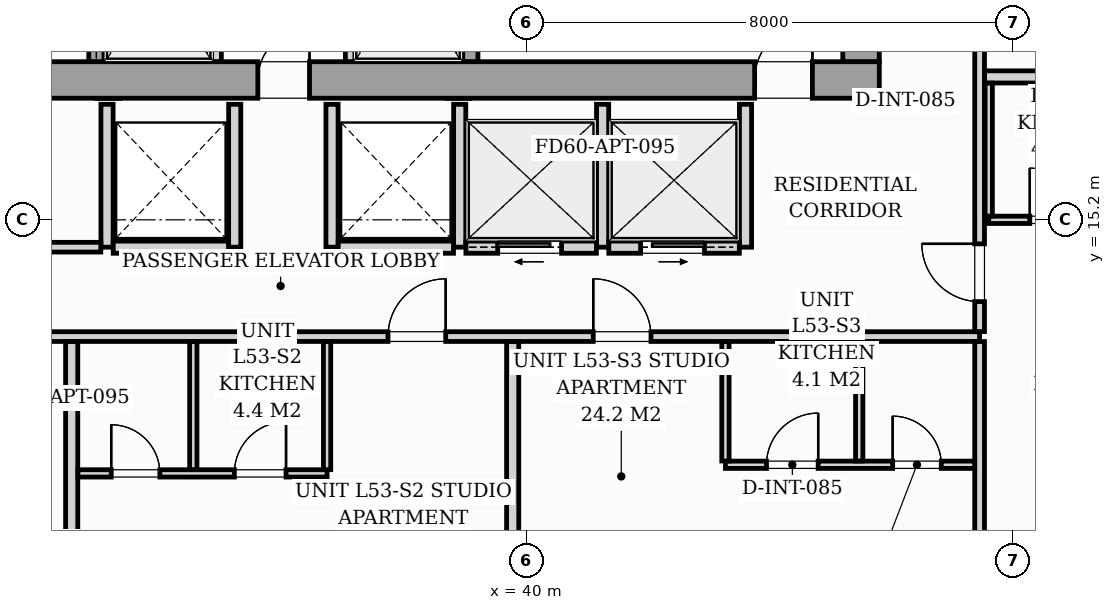
"""IFC4 building model, lengths in metres.
Left out: names, types, materials, properties, quantities, classifications, styles, units other than length and angle.
Written with IfcOpenShell. Run it as: python <this file> out.ifc"""

import sys

from ifc_helpers import new_model, si_unit, direction, frame, frame_2d, origin, origin_2d, place, context, subcontext, project, spatial, rectangle, i_section, extrude, source, transform, mapped, element, fill, save


model = new_model("IFC4")
c1 = context("Model", 3, precision=1e-05, world=origin(), true_north=direction((0.0, 1.0)))
c2 = subcontext(c1, "Body", "Model", "MODEL_VIEW")
j1 = project(units=[si_unit("LENGTHUNIT", "METRE"), si_unit("PLANEANGLEUNIT", "RADIAN")], contexts=[c1])
p1 = place(None, origin())
s1 = spatial("IfcSite", under=j1, at=p1, CompositionType="ELEMENT")
p2 = place(p1, origin())
s2 = spatial("IfcBuilding", under=s1, at=p2, CompositionType="ELEMENT")
p3 = place(p2, frame((0.0, 0.0, 185.8)))
s3 = spatial("IfcBuildingStorey", under=s2, at=p3, CompositionType="ELEMENT", Elevation=185.8)
m1 = source(origin(), c2, "Body", "SweptSolid", [
    extrude(i_section(OverallWidth=0.416, OverallDepth=0.446, WebThickness=0.039, FlangeThickness=0.063, FilletRadius=0.018, at=origin_2d()), origin(), (0.0, 0.0, 1.0), 3.196),
])
for number, where, z_axis, x_axis in (
    (1, (33.12, 17.4, 0.002), (0.0, 0.0, 1.0), (1.0, 0.0, 0.0)),
    (2, (38.88, 17.4, 0.002), (0.0, 0.0, 1.0), (1.0, 0.0, 0.0)),
    (3, (45.6, 17.4, 0.002), (0.0, 0.0, 1.0), (1.0, 0.0, 0.0)),
):
    element("IfcColumn", number, at=place(p3, frame(where, z_axis=z_axis, x_axis=x_axis)), inside=s3, PredefinedType="PILASTER", context=c2, shape_type="MappedRepresentation", body=[
        mapped(m1, transform((0.0, 0.0, 0.0), scale=1.0)),
    ])
p4 = place(p3, frame((62.963, 10.676, 0.0), z_axis=(0.0, 0.0, 1.0), x_axis=(-0.995395627913, -0.095851676732, 0.0)))
e4 = element("IfcWall", 4, at=p4, inside=s3, PredefinedType="STANDARD", context=c2, shape_type="SweptSolid", body=[
    extrude(rectangle(XDim=16.1, YDim=0.26, at=frame_2d((8.05, 0.0))), origin(), (0.0, 0.0, 1.0), 2.94),
])
p5 = place(p4, frame((8.101, 0.0, 0.0)))
e5 = element("IfcOpeningElement", 5, at=p5, cuts=e4, PredefinedType="OPENING", context=c2, shape_type="SweptSolid", body=[
    extrude(rectangle(XDim=1.8, YDim=2.06, at=frame_2d((0.9, 1.03))), frame((0.0, 0.14, 0.0), z_axis=(0.0, -1.0, 0.0), x_axis=(1.0, 0.0, 0.0)), (0.0, 0.0, 1.0), 0.28),
])
p6 = place(p4, frame((2.05, 0.0, 0.65)))
e6 = element("IfcOpeningElement", 6, at=p6, cuts=e4, PredefinedType="OPENING", context=c2, shape_type="SweptSolid", body=[
    extrude(rectangle(XDim=1.6, YDim=1.5, at=frame_2d((0.8, 0.75))), frame((0.0, 0.14, 0.0), z_axis=(0.0, -1.0, 0.0), x_axis=(1.0, 0.0, 0.0)), (0.0, 0.0, 1.0), 0.28),
])
p7 = place(p3, frame((26.2, 17.5, 0.0), z_axis=(0.0, 0.0, 1.0), x_axis=(1.0, 0.0, 0.0)))
e7 = element("IfcWall", 7, at=p7, inside=s3, PredefinedType="SHEAR", context=c2, shape_type="SweptSolid", body=[
    extrude(rectangle(XDim=19.6, YDim=0.6, at=frame_2d((9.8, 0.0))), origin(), (0.0, 0.0, 1.0), 3.2),
])
p8 = place(p7, frame((0.95, 0.0, 0.0)))
e8 = element("IfcOpeningElement", 8, at=p8, cuts=e7, PredefinedType="OPENING", context=c2, shape_type="SweptSolid", body=[
    extrude(rectangle(XDim=0.95, YDim=2.06, at=frame_2d((0.475, 1.03))), frame((0.0, 0.31, 0.0), z_axis=(0.0, -1.0, 0.0), x_axis=(1.0, 0.0, 0.0)), (0.0, 0.0, 1.0), 0.62),
])
p9 = place(p7, frame((9.38, 0.0, 0.0)))
e9 = element("IfcOpeningElement", 9, at=p9, cuts=e7, PredefinedType="OPENING", context=c2, shape_type="SweptSolid", body=[
    extrude(rectangle(XDim=0.85, YDim=2.0, at=frame_2d((0.425, 1.0))), frame((0.0, 0.31, 0.0), z_axis=(0.0, -1.0, 0.0), x_axis=(1.0, 0.0, 0.0)), (0.0, 0.0, 1.0), 0.62),
])
p10 = place(p7, frame((17.55, 0.0, 0.0)))
e10 = element("IfcOpeningElement", 10, at=p10, cuts=e7, PredefinedType="OPENING", context=c2, shape_type="SweptSolid", body=[
    extrude(rectangle(XDim=0.95, YDim=2.06, at=frame_2d((0.475, 1.03))), frame((0.0, 0.31, 0.0), z_axis=(0.0, -1.0, 0.0), x_axis=(1.0, 0.0, 0.0)), (0.0, 0.0, 1.0), 0.62),
])
p11 = place(p3, frame((45.5, 17.802, 0.0), z_axis=(0.0, 0.0, 1.0), x_axis=(0.0, 1.0, 0.0)))
e11 = element("IfcWall", 11, at=p11, inside=s3, PredefinedType="SHEAR", context=c2, shape_type="SweptSolid", body=[
    extrude(rectangle(XDim=5.796, YDim=0.6, at=frame_2d((2.898, 0.0))), origin(), (0.0, 0.0, 1.0), 3.2),
])
p12 = place(p3, frame((32.925, 17.802, 0.0), z_axis=(0.0, 0.0, 1.0), x_axis=(0.0, 1.0, 0.0)))
e12 = element("IfcWall", 12, at=p12, inside=s3, PredefinedType="SOLIDWALL", context=c2, shape_type="SweptSolid", body=[
    extrude(rectangle(XDim=2.646, YDim=0.25, at=frame_2d((1.323, 0.0))), origin(), (0.0, 0.0, 1.0), 3.2),
])
p13 = place(p12, frame((0.548, 0.0, 0.0)))
e13 = element("IfcOpeningElement", 13, at=p13, cuts=e12, PredefinedType="OPENING", context=c2, shape_type="SweptSolid", body=[
    extrude(rectangle(XDim=1.1, YDim=2.08, at=frame_2d((0.55, 1.04))), frame((0.0, 0.135, 0.0), z_axis=(0.0, -1.0, 0.0), x_axis=(1.0, 0.0, 0.0)), (0.0, 0.0, 1.0), 0.27),
])
for number, where, z_axis, x_axis in (
    (14, (34.9, 17.802, 0.0), (0.0, 0.0, 1.0), (0.0, 1.0, 0.0)),
    (15, (37.1, 17.802, 0.0), (0.0, 0.0, 1.0), (0.0, 1.0, 0.0)),
):
    element("IfcWall", number, at=place(p3, frame(where, z_axis=z_axis, x_axis=x_axis)), inside=s3, PredefinedType="PARTITIONING", context=c2, shape_type="SweptSolid", body=[
        extrude(rectangle(XDim=2.646, YDim=0.16, at=frame_2d((1.323, 0.0))), origin(), (0.0, 0.0, 1.0), 2.94),
    ])
p14 = place(p3, frame((39.075, 17.802, 0.0), z_axis=(0.0, 0.0, 1.0), x_axis=(0.0, 1.0, 0.0)))
e16 = element("IfcWall", 16, at=p14, inside=s3, PredefinedType="SOLIDWALL", context=c2, shape_type="SweptSolid", body=[
    extrude(rectangle(XDim=2.646, YDim=0.25, at=frame_2d((1.323, 0.0))), origin(), (0.0, 0.0, 1.0), 3.2),
])
p15 = place(p14, frame((0.548, 0.0, 0.0)))
e17 = element("IfcOpeningElement", 17, at=p15, cuts=e16, PredefinedType="OPENING", context=c2, shape_type="SweptSolid", body=[
    extrude(rectangle(XDim=1.1, YDim=2.08, at=frame_2d((0.55, 1.04))), frame((0.0, 0.135, 0.0), z_axis=(0.0, -1.0, 0.0), x_axis=(1.0, 0.0, 0.0)), (0.0, 0.0, 1.0), 0.27),
])
p16 = place(p3, frame((33.1, 14.75, 0.0), z_axis=(0.0, 0.0, 1.0), x_axis=(0.0, 1.0, 0.0)))
e18 = element("IfcWall", 18, at=p16, inside=s3, PredefinedType="PARTITIONING", context=c2, shape_type="SweptSolid", body=[
    extrude(rectangle(XDim=2.35, YDim=0.2, at=frame_2d((1.175, 0.0))), origin(), (0.0, 0.0, 1.0), 2.94),
])
p17 = place(p3, frame((28.482, 14.75, 0.0), z_axis=(0.0, 0.0, 1.0), x_axis=(1.0, 0.0, 0.0)))
e19 = element("IfcWall", 19, at=p17, inside=s3, PredefinedType="PARTITIONING", context=c2, shape_type="SweptSolid", body=[
    extrude(rectangle(XDim=4.516, YDim=0.16, at=frame_2d((2.258, 0.0))), origin(), (0.0, 0.0, 1.0), 2.94),
])
p18 = place(p17, frame((1.868, 0.0, 0.0)))
e20 = element("IfcOpeningElement", 20, at=p18, cuts=e19, PredefinedType="OPENING", context=c2, shape_type="SweptSolid", body=[
    extrude(rectangle(XDim=0.8, YDim=2.05, at=frame_2d((0.4, 1.025))), frame((0.0, 0.09, 0.0), z_axis=(0.0, -1.0, 0.0), x_axis=(1.0, 0.0, 0.0)), (0.0, 0.0, 1.0), 0.18),
])
p19 = place(p3, frame((35.2, 14.75, 0.0), z_axis=(0.0, 0.0, 1.0), x_axis=(0.0, 1.0, 0.0)))
e21 = element("IfcWall", 21, at=p19, inside=s3, PredefinedType="PARTITIONING", context=c2, shape_type="SweptSolid", body=[
    extrude(rectangle(XDim=2.35, YDim=0.2, at=frame_2d((1.175, 0.0))), origin(), (0.0, 0.0, 1.0), 2.94),
])
p20 = place(p3, frame((33.202, 14.75, 0.0), z_axis=(0.0, 0.0, 1.0), x_axis=(1.0, 0.0, 0.0)))
e22 = element("IfcWall", 22, at=p20, inside=s3, PredefinedType="PARTITIONING", context=c2, shape_type="SweptSolid", body=[
    extrude(rectangle(XDim=1.896, YDim=0.2, at=frame_2d((0.948, 0.0))), origin(), (0.0, 0.0, 1.0), 2.94),
])
for number, where, z_axis, x_axis in (
    (23, (36.8, 14.75, 0.0), (0.0, 0.0, 1.0), (0.0, 1.0, 0.0)),
    (24, (38.9, 14.75, 0.0), (0.0, 0.0, 1.0), (0.0, 1.0, 0.0)),
):
    element("IfcWall", number, at=place(p3, frame(where, z_axis=z_axis, x_axis=x_axis)), inside=s3, PredefinedType="PARTITIONING", context=c2, shape_type="SweptSolid", body=[
        extrude(rectangle(XDim=2.35, YDim=0.2, at=frame_2d((1.175, 0.0))), origin(), (0.0, 0.0, 1.0), 2.94),
    ])
p21 = place(p3, frame((36.902, 14.75, 0.0), z_axis=(0.0, 0.0, 1.0), x_axis=(1.0, 0.0, 0.0)))
e25 = element("IfcWall", 25, at=p21, inside=s3, PredefinedType="PARTITIONING", context=c2, shape_type="SweptSolid", body=[
    extrude(rectangle(XDim=1.896, YDim=0.2, at=frame_2d((0.948, 0.0))), origin(), (0.0, 0.0, 1.0), 2.94),
])
for number, where, z_axis, x_axis in (
    (26, (41.25, 14.75, 0.0), (0.0, 0.0, 1.0), (0.0, 1.0, 0.0)),
    (27, (43.6, 14.75, 0.0), (0.0, 0.0, 1.0), (0.0, 1.0, 0.0)),
):
    element("IfcWall", number, at=place(p3, frame(where, z_axis=z_axis, x_axis=x_axis)), inside=s3, PredefinedType="PARTITIONING", context=c2, shape_type="SweptSolid", body=[
        extrude(rectangle(XDim=2.35, YDim=0.2, at=frame_2d((1.175, 0.0))), origin(), (0.0, 0.0, 1.0), 2.94),
    ])
p22 = place(p3, frame((39.002, 14.75, 0.0), z_axis=(0.0, 0.0, 1.0), x_axis=(1.0, 0.0, 0.0)))
e28 = element("IfcWall", 28, at=p22, inside=s3, PredefinedType="PARTITIONING", context=c2, shape_type="SweptSolid", body=[
    extrude(rectangle(XDim=2.146, YDim=0.2, at=frame_2d((1.073, 0.0))), origin(), (0.0, 0.0, 1.0), 2.94),
])
p23 = place(p22, frame((0.523, 0.0, 0.0)))
e29 = element("IfcOpeningElement", 29, at=p23, cuts=e28, PredefinedType="OPENING", context=c2, shape_type="SweptSolid", body=[
    extrude(rectangle(XDim=1.05, YDim=2.08, at=frame_2d((0.525, 1.04))), frame((0.0, 0.11, 0.0), z_axis=(0.0, -1.0, 0.0), x_axis=(1.0, 0.0, 0.0)), (0.0, 0.0, 1.0), 0.22),
])
p24 = place(p3, frame((41.352, 14.75, 0.0), z_axis=(0.0, 0.0, 1.0), x_axis=(1.0, 0.0, 0.0)))
e30 = element("IfcWall", 30, at=p24, inside=s3, PredefinedType="PARTITIONING", context=c2, shape_type="SweptSolid", body=[
    extrude(rectangle(XDim=2.146, YDim=0.2, at=frame_2d((1.073, 0.0))), origin(), (0.0, 0.0, 1.0), 2.94),
])
p25 = place(p24, frame((0.523, 0.0, 0.0)))
e31 = element("IfcOpeningElement", 31, at=p25, cuts=e30, PredefinedType="OPENING", context=c2, shape_type="SweptSolid", body=[
    extrude(rectangle(XDim=1.05, YDim=2.08, at=frame_2d((0.525, 1.04))), frame((0.0, 0.11, 0.0), z_axis=(0.0, -1.0, 0.0), x_axis=(1.0, 0.0, 0.0)), (0.0, 0.0, 1.0), 0.22),
])
p26 = place(p3, frame((26.12, 13.28, 0.0), z_axis=(0.0, 0.0, 1.0), x_axis=(1.0, 0.0, 0.0)))
e32 = element("IfcWall", 32, at=p26, inside=s3, PredefinedType="PARTITIONING", context=c2, shape_type="SweptSolid", body=[
    extrude(rectangle(XDim=21.33, YDim=0.16, at=frame_2d((10.665, 0.0))), origin(), (0.0, 0.0, 1.0), 2.94),
])
p27 = place(p26, frame((4.704, 0.0, 0.0)))
e33 = element("IfcOpeningElement", 33, at=p27, cuts=e32, PredefinedType="OPENING", context=c2, shape_type="SweptSolid", body=[
    extrude(rectangle(XDim=0.95, YDim=2.06, at=frame_2d((0.475, 1.03))), frame((0.0, 0.09, 0.0), z_axis=(0.0, -1.0, 0.0), x_axis=(1.0, 0.0, 0.0)), (0.0, 0.0, 1.0), 0.18),
])
p28 = place(p26, frame((11.6, 0.0, 0.0)))
e34 = element("IfcOpeningElement", 34, at=p28, cuts=e32, PredefinedType="OPENING", context=c2, shape_type="SweptSolid", body=[
    extrude(rectangle(XDim=0.95, YDim=2.06, at=frame_2d((0.475, 1.03))), frame((0.0, 0.09, 0.0), z_axis=(0.0, -1.0, 0.0), x_axis=(1.0, 0.0, 0.0)), (0.0, 0.0, 1.0), 0.18),
])
p29 = place(p26, frame((14.976, 0.0, 0.0)))
e35 = element("IfcOpeningElement", 35, at=p29, cuts=e32, PredefinedType="OPENING", context=c2, shape_type="SweptSolid", body=[
    extrude(rectangle(XDim=0.95, YDim=2.06, at=frame_2d((0.475, 1.03))), frame((0.0, 0.09, 0.0), z_axis=(0.0, -1.0, 0.0), x_axis=(1.0, 0.0, 0.0)), (0.0, 0.0, 1.0), 0.18),
])
p30 = place(p3, frame((47.45, 9.315, 0.0), z_axis=(0.0, 0.0, 1.0), x_axis=(0.0, 1.0, 0.0)))
e36 = element("IfcWall", 36, at=p30, inside=s3, PredefinedType="PARTITIONING", context=c2, shape_type="SweptSolid", body=[
    extrude(rectangle(XDim=3.883, YDim=0.16, at=frame_2d((1.941, 0.0))), origin(), (0.0, 0.0, 1.0), 2.94),
])
p31 = place(p3, frame((47.45, 13.362, 0.0), z_axis=(0.0, 0.0, 1.0), x_axis=(0.0, 1.0, 0.0)))
e37 = element("IfcWall", 37, at=p31, inside=s3, PredefinedType="PARTITIONING", context=c2, shape_type="SweptSolid", body=[
    extrude(rectangle(XDim=7.288, YDim=0.16, at=frame_2d((3.644, 0.0))), origin(), (0.0, 0.0, 1.0), 2.94),
])
p32 = place(p31, frame((0.493, 0.0, 0.0)))
e38 = element("IfcOpeningElement", 38, at=p32, cuts=e37, PredefinedType="OPENING", context=c2, shape_type="SweptSolid", body=[
    extrude(rectangle(XDim=0.95, YDim=2.06, at=frame_2d((0.475, 1.03))), frame((0.0, 0.09, 0.0), z_axis=(0.0, -1.0, 0.0), x_axis=(1.0, 0.0, 0.0)), (0.0, 0.0, 1.0), 0.18),
])
p33 = place(p31, frame((4.783, 0.0, 0.0)))
e39 = element("IfcOpeningElement", 39, at=p33, cuts=e37, PredefinedType="OPENING", context=c2, shape_type="SweptSolid", body=[
    extrude(rectangle(XDim=0.95, YDim=2.06, at=frame_2d((0.475, 1.03))), frame((0.0, 0.09, 0.0), z_axis=(0.0, -1.0, 0.0), x_axis=(1.0, 0.0, 0.0)), (0.0, 0.0, 1.0), 0.18),
])
p34 = place(p3, frame((32.519, 7.877, 0.0), z_axis=(0.0, 0.0, 1.0), x_axis=(0.0, 1.0, 0.0)))
e40 = element("IfcWall", 40, at=p34, inside=s3, PredefinedType="PARTITIONING", context=c2, shape_type="SweptSolid", body=[
    extrude(rectangle(XDim=5.321, YDim=0.2, at=frame_2d((2.66, 0.0))), origin(), (0.0, 0.0, 1.0), 2.94),
])
p35 = place(p3, frame((32.621, 11.03, 0.0), z_axis=(0.0, 0.0, 1.0), x_axis=(1.0, 0.0, 0.0)))
e41 = element("IfcWall", 41, at=p35, inside=s3, PredefinedType="PARTITIONING", context=c2, shape_type="SweptSolid", body=[
    extrude(rectangle(XDim=4.098, YDim=0.12, at=frame_2d((2.049, 0.0))), origin(), (0.0, 0.0, 1.0), 2.94),
])
p36 = place(p35, frame((0.548, 0.0, 0.0)))
e42 = element("IfcOpeningElement", 42, at=p36, cuts=e41, PredefinedType="OPENING", context=c2, shape_type="SweptSolid", body=[
    extrude(rectangle(XDim=0.8, YDim=2.02, at=frame_2d((0.4, 1.01))), frame((0.0, 0.07, 0.0), z_axis=(0.0, -1.0, 0.0), x_axis=(1.0, 0.0, 0.0)), (0.0, 0.0, 1.0), 0.14),
])
p37 = place(p35, frame((2.573, 0.0, 0.0)))
e43 = element("IfcOpeningElement", 43, at=p37, cuts=e41, PredefinedType="OPENING", context=c2, shape_type="SweptSolid", body=[
    extrude(rectangle(XDim=0.85, YDim=2.05, at=frame_2d((0.425, 1.025))), frame((0.0, 0.07, 0.0), z_axis=(0.0, -1.0, 0.0), x_axis=(1.0, 0.0, 0.0)), (0.0, 0.0, 1.0), 0.14),
])
for number, where, z_axis, x_axis in (
    (44, (36.719, 11.092, 0.0), (0.0, 0.0, 1.0), (0.0, 1.0, 0.0)),
    (45, (34.519, 11.092, 0.0), (0.0, 0.0, 1.0), (0.0, 1.0, 0.0)),
):
    element("IfcWall", number, at=place(p3, frame(where, z_axis=z_axis, x_axis=x_axis)), inside=s3, PredefinedType="PARTITIONING", context=c2, shape_type="SweptSolid", body=[
        extrude(rectangle(XDim=2.106, YDim=0.12, at=frame_2d((1.053, 0.0))), origin(), (0.0, 0.0, 1.0), 2.94),
    ])
p38 = place(p3, frame((39.771, 8.393, 0.0), z_axis=(0.0, 0.0, 1.0), x_axis=(0.0, 1.0, 0.0)))
e46 = element("IfcWall", 46, at=p38, inside=s3, PredefinedType="PARTITIONING", context=c2, shape_type="SweptSolid", body=[
    extrude(rectangle(XDim=4.805, YDim=0.2, at=frame_2d((2.403, 0.0))), origin(), (0.0, 0.0, 1.0), 2.94),
])
p39 = place(p3, frame((43.27, 11.172, 0.0), z_axis=(0.0, 0.0, 1.0), x_axis=(1.0, 0.0, 0.0)))
e47 = element("IfcWall", 47, at=p39, inside=s3, PredefinedType="PARTITIONING", context=c2, shape_type="SweptSolid", body=[
    extrude(rectangle(XDim=4.098, YDim=0.12, at=frame_2d((2.049, 0.0))), origin(), (0.0, 0.0, 1.0), 2.94),
])
p40 = place(p39, frame((0.675, 0.0, 0.0)))
e48 = element("IfcOpeningElement", 48, at=p40, cuts=e47, PredefinedType="OPENING", context=c2, shape_type="SweptSolid", body=[
    extrude(rectangle(XDim=0.85, YDim=2.05, at=frame_2d((0.425, 1.025))), frame((0.0, 0.07, 0.0), z_axis=(0.0, -1.0, 0.0), x_axis=(1.0, 0.0, 0.0)), (0.0, 0.0, 1.0), 0.14),
])
p41 = place(p39, frame((2.75, 0.0, 0.0)))
e49 = element("IfcOpeningElement", 49, at=p41, cuts=e47, PredefinedType="OPENING", context=c2, shape_type="SweptSolid", body=[
    extrude(rectangle(XDim=0.8, YDim=2.02, at=frame_2d((0.4, 1.01))), frame((0.0, 0.07, 0.0), z_axis=(0.0, -1.0, 0.0), x_axis=(1.0, 0.0, 0.0)), (0.0, 0.0, 1.0), 0.14),
])
for number, where, z_axis, x_axis in (
    (50, (43.27, 11.234, 0.0), (0.0, 0.0, 1.0), (0.0, 1.0, 0.0)),
    (51, (45.47, 11.234, 0.0), (0.0, 0.0, 1.0), (0.0, 1.0, 0.0)),
):
    element("IfcWall", number, at=place(p3, frame(where, z_axis=z_axis, x_axis=x_axis)), inside=s3, PredefinedType="PARTITIONING", context=c2, shape_type="SweptSolid", body=[
        extrude(rectangle(XDim=1.964, YDim=0.12, at=frame_2d((0.982, 0.0))), origin(), (0.0, 0.0, 1.0), 2.94),
    ])
p42 = place(p3, frame((47.532, 17.55, 0.0), z_axis=(0.0, 0.0, 1.0), x_axis=(1.0, 0.0, 0.0)))
e52 = element("IfcWall", 52, at=p42, inside=s3, PredefinedType="PARTITIONING", context=c2, shape_type="SweptSolid", body=[
    extrude(rectangle(XDim=17.201, YDim=0.2, at=frame_2d((8.601, 0.0))), origin(), (0.0, 0.0, 1.0), 2.281),
])
p43 = place(p3, frame((47.6, 15.2, 0.0), z_axis=(0.0, 0.0, 1.0), x_axis=(1.0, 0.0, 0.0)))
e53 = element("IfcWall", 53, at=p43, inside=s3, PredefinedType="PARTITIONING", context=c2, shape_type="SweptSolid", body=[
    extrude(rectangle(XDim=4.2, YDim=0.12, at=frame_2d((2.1, 0.0))), origin(), (0.0, 0.0, 1.0), 2.94),
])
p44 = place(p43, frame((0.675, 0.0, 0.0)))
e54 = element("IfcOpeningElement", 54, at=p44, cuts=e53, PredefinedType="OPENING", context=c2, shape_type="SweptSolid", body=[
    extrude(rectangle(XDim=0.85, YDim=2.05, at=frame_2d((0.425, 1.025))), frame((0.0, 0.07, 0.0), z_axis=(0.0, -1.0, 0.0), x_axis=(1.0, 0.0, 0.0)), (0.0, 0.0, 1.0), 0.14),
])
p45 = place(p43, frame((2.8, 0.0, 0.0)))
e55 = element("IfcOpeningElement", 55, at=p45, cuts=e53, PredefinedType="OPENING", context=c2, shape_type="SweptSolid", body=[
    extrude(rectangle(XDim=0.8, YDim=2.02, at=frame_2d((0.4, 1.01))), frame((0.0, 0.07, 0.0), z_axis=(0.0, -1.0, 0.0), x_axis=(1.0, 0.0, 0.0)), (0.0, 0.0, 1.0), 0.14),
])
p46 = place(p3, frame((47.6, 15.262, 0.0), z_axis=(0.0, 0.0, 1.0), x_axis=(0.0, 1.0, 0.0)))
e56 = element("IfcWall", 56, at=p46, inside=s3, PredefinedType="PARTITIONING", context=c2, shape_type="SweptSolid", body=[
    extrude(rectangle(XDim=2.186, YDim=0.12, at=frame_2d((1.093, 0.0))), origin(), (0.0, 0.0, 1.0), 2.94),
])
m2 = source(origin(), c2, "Body", "SweptSolid", [
    extrude(rectangle(XDim=0.85, YDim=2.0, at=frame_2d((0.425, 1.0))), frame((0.0, 0.025, 0.0), z_axis=(0.0, -1.0, 0.0), x_axis=(1.0, 0.0, 0.0)), (0.0, 0.0, 1.0), 0.05),
])
p47 = place(p9, origin())
e57 = element("IfcDoor", 57, at=p47, inside=s3, OperationType="SINGLE_SWING_RIGHT", PredefinedType="DOOR", context=c2, shape_type="MappedRepresentation", body=[
    mapped(m2, transform((0.0, 0.0, 0.0), scale=1.0)),
])
fill(e9, e57)
m3 = source(origin(), c2, "Body", "SweptSolid", [
    extrude(rectangle(XDim=0.95, YDim=2.06, at=frame_2d((0.475, 1.03))), frame((0.0, 0.025, 0.0), z_axis=(0.0, -1.0, 0.0), x_axis=(1.0, 0.0, 0.0)), (0.0, 0.0, 1.0), 0.05),
])
p48 = place(p10, origin())
e58 = element("IfcDoor", 58, at=p48, inside=s3, OperationType="SINGLE_SWING_RIGHT", PredefinedType="DOOR", context=c2, shape_type="MappedRepresentation", body=[
    mapped(m3, transform((0.0, 0.0, 0.0), scale=1.0)),
])
fill(e10, e58)
m4 = source(origin(), c2, "Body", "SweptSolid", [
    extrude(rectangle(XDim=1.05, YDim=2.08, at=frame_2d((0.525, 1.04))), frame((0.0, 0.025, 0.0), z_axis=(0.0, -1.0, 0.0), x_axis=(1.0, 0.0, 0.0)), (0.0, 0.0, 1.0), 0.05),
])
p49 = place(p23, origin())
e59 = element("IfcDoor", 59, at=p49, inside=s3, OperationType="SLIDING_TO_LEFT", PredefinedType="DOOR", context=c2, shape_type="MappedRepresentation", body=[
    mapped(m4, transform((0.0, 0.0, 0.0), scale=1.0)),
])
fill(e29, e59)
p50 = place(p25, origin())
e60 = element("IfcDoor", 60, at=p50, inside=s3, OperationType="SLIDING_TO_RIGHT", PredefinedType="DOOR", context=c2, shape_type="MappedRepresentation", body=[
    mapped(m4, transform((0.0, 0.0, 0.0), scale=1.0)),
])
fill(e31, e60)
m5 = source(origin(), c2, "Body", "SweptSolid", [
    extrude(rectangle(XDim=0.95, YDim=2.06, at=frame_2d((0.475, 1.03))), frame((0.0, 0.025, 0.0), z_axis=(0.0, -1.0, 0.0), x_axis=(1.0, 0.0, 0.0)), (0.0, 0.0, 1.0), 0.05),
])
p51 = place(p28, origin())
e61 = element("IfcDoor", 61, at=p51, inside=s3, OperationType="SINGLE_SWING_RIGHT", PredefinedType="DOOR", context=c2, shape_type="MappedRepresentation", body=[
    mapped(m5, transform((0.0, 0.0, 0.0), scale=1.0)),
])
fill(e34, e61)
m6 = source(origin(), c2, "Body", "SweptSolid", [
    extrude(rectangle(XDim=0.8, YDim=2.02, at=frame_2d((0.4, 1.01))), frame((0.0, 0.025, 0.0), z_axis=(0.0, -1.0, 0.0), x_axis=(1.0, 0.0, 0.0)), (0.0, 0.0, 1.0), 0.05),
])
p52 = place(p36, origin())
e62 = element("IfcDoor", 62, at=p52, inside=s3, OperationType="SINGLE_SWING_LEFT", PredefinedType="DOOR", context=c2, shape_type="MappedRepresentation", body=[
    mapped(m6, transform((0.0, 0.0, 0.0), scale=1.0)),
])
fill(e42, e62)
m7 = source(origin(), c2, "Body", "SweptSolid", [
    extrude(rectangle(XDim=0.85, YDim=2.05, at=frame_2d((0.425, 1.025))), frame((0.0, 0.025, 0.0), z_axis=(0.0, -1.0, 0.0), x_axis=(1.0, 0.0, 0.0)), (0.0, 0.0, 1.0), 0.05),
])
p53 = place(p37, origin())
e63 = element("IfcDoor", 63, at=p53, inside=s3, OperationType="SINGLE_SWING_RIGHT", PredefinedType="DOOR", context=c2, shape_type="MappedRepresentation", body=[
    mapped(m7, transform((0.0, 0.0, 0.0), scale=1.0)),
])
fill(e43, e63)
p54 = place(p29, origin())
e64 = element("IfcDoor", 64, at=p54, inside=s3, OperationType="SINGLE_SWING_LEFT", PredefinedType="DOOR", context=c2, shape_type="MappedRepresentation", body=[
    mapped(m5, transform((0.0, 0.0, 0.0), scale=1.0)),
])
fill(e35, e64)
p55 = place(p40, origin())
e65 = element("IfcDoor", 65, at=p55, inside=s3, OperationType="SINGLE_SWING_RIGHT", PredefinedType="DOOR", context=c2, shape_type="MappedRepresentation", body=[
    mapped(m7, transform((0.0, 0.0, 0.0), scale=1.0)),
])
fill(e48, e65)
p56 = place(p41, origin())
e66 = element("IfcDoor", 66, at=p56, inside=s3, OperationType="SINGLE_SWING_LEFT", PredefinedType="DOOR", context=c2, shape_type="MappedRepresentation", body=[
    mapped(m6, transform((0.0, 0.0, 0.0), scale=1.0)),
])
fill(e49, e66)
p57 = place(p32, origin())
e67 = element("IfcDoor", 67, at=p57, inside=s3, OperationType="SINGLE_SWING_RIGHT", PredefinedType="DOOR", context=c2, shape_type="MappedRepresentation", body=[
    mapped(m5, transform((0.0, 0.0, 0.0), scale=1.0)),
])
fill(e38, e67)
p58 = place(p44, origin())
e68 = element("IfcDoor", 68, at=p58, inside=s3, OperationType="SINGLE_SWING_LEFT", PredefinedType="DOOR", context=c2, shape_type="MappedRepresentation", body=[
    mapped(m7, transform((0.0, 0.0, 0.0), scale=1.0)),
])
fill(e54, e68)
save(model, sys.argv[1])
